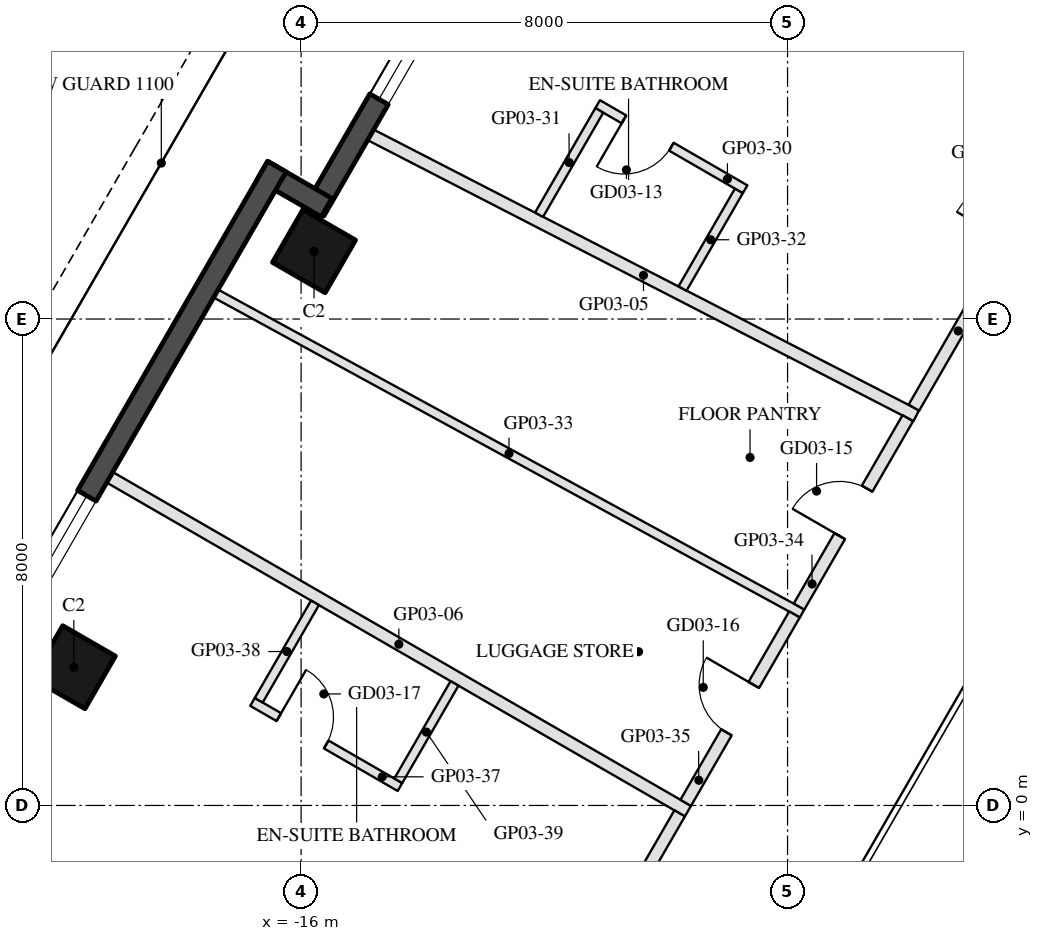
"""IFC4 building model, lengths in metres.
Left out: names, types, materials, properties, quantities, classifications, styles, units other than length and angle.
Written with IfcOpenShell. Run it as: python <this file> out.ifc"""

import sys

from ifc_helpers import new_model, si_unit, direction, frame, frame_2d, origin, origin_2d, place, context, subcontext, project, spatial, rectangle, hollow_rectangle, extrude, element, fill, save


model = new_model("IFC4")
c1 = context("Model", 3, precision=1e-05, world=origin(), true_north=direction((0.0, 1.0)))
c2 = subcontext(c1, "Body", "Model", "MODEL_VIEW")
j1 = project(units=[si_unit("LENGTHUNIT", "METRE"), si_unit("PLANEANGLEUNIT", "RADIAN")], contexts=[c1])
p1 = place(None, origin())
s1 = spatial("IfcSite", under=j1, at=p1, CompositionType="ELEMENT")
p2 = place(p1, origin())
s2 = spatial("IfcBuilding", under=s1, at=p2, CompositionType="ELEMENT")
p3 = place(p2, frame((0.0, 0.0, 61.3)))
s3 = spatial("IfcBuildingStorey", under=s2, at=p3, CompositionType="ELEMENT", Elevation=61.3)
for number, where, z_axis, x_axis in (
    (1, (-15.788, 9.115, 0.0), (0.0, 0.0, 1.0), (0.5, 0.866, 0.0)),
    (2, (-19.738, 2.273, 0.0), (0.0, 0.0, 1.0), (0.5, 0.866, 0.0)),
):
    element("IfcColumn", number, at=place(p3, frame(where, z_axis=z_axis, x_axis=x_axis)), inside=s3, PredefinedType="COLUMN", context=c2, shape_type="SweptSolid", body=[
        extrude(hollow_rectangle(XDim=1.0, YDim=1.0, WallThickness=0.045, at=origin_2d()), origin(), (0.0, 0.0, 1.0), 3.7),
    ])
p4 = place(p3, frame((-12.409, 15.617, 0.0), z_axis=(0.0, 0.0, 1.0), x_axis=(-0.500003597184, -0.866023326939, 0.0)))
e3 = element("IfcWall", 3, at=p4, inside=s3, PredefinedType="SOLIDWALL", context=c2, shape_type="SweptSolid", body=[
    extrude(rectangle(XDim=6.74, YDim=0.35, at=frame_2d((3.37, 0.0))), origin(), (0.0, 0.0, 1.0), 3.55),
])
p5 = place(p4, frame((0.32, 0.0, 0.3)))
e4 = element("IfcOpeningElement", 4, at=p5, cuts=e3, PredefinedType="OPENING", context=c2, shape_type="SweptSolid", body=[
    extrude(rectangle(XDim=2.0, YDim=2.65, at=frame_2d((1.0, 1.325))), frame((0.0, 0.185, 0.0), z_axis=(0.0, -1.0, 0.0), x_axis=(1.0, 0.0, 0.0)), (0.0, 0.0, 1.0), 0.37),
])
p6 = place(p4, frame((2.62, 0.0, 0.3)))
e5 = element("IfcOpeningElement", 5, at=p6, cuts=e3, PredefinedType="OPENING", context=c2, shape_type="SweptSolid", body=[
    extrude(rectangle(XDim=2.0, YDim=2.65, at=frame_2d((1.0, 1.325))), frame((0.0, 0.185, 0.0), z_axis=(0.0, -1.0, 0.0), x_axis=(1.0, 0.0, 0.0)), (0.0, 0.0, 1.0), 0.37),
])
p7 = place(p3, frame((-15.581, 9.833, 0.0), z_axis=(0.0, 0.0, 1.0), x_axis=(-0.866055662726, 0.499947586314, 0.0)))
e6 = element("IfcWall", 6, at=p7, inside=s3, PredefinedType="SOLIDWALL", context=c2, shape_type="SweptSolid", body=[
    extrude(rectangle(XDim=1.22, YDim=0.35, at=frame_2d((0.61, 0.0))), origin(), (0.0, 0.0, 1.0), 3.55),
])
p8 = place(p3, frame((-16.398, 10.507, 0.0), z_axis=(0.0, 0.0, 1.0), x_axis=(-0.499999142773, -0.866025898704, 0.0)))
e7 = element("IfcWall", 7, at=p8, inside=s3, PredefinedType="SOLIDWALL", context=c2, shape_type="SweptSolid", body=[
    extrude(rectangle(XDim=9.7, YDim=0.35, at=frame_2d((4.85, 0.0))), origin(), (0.0, 0.0, 1.0), 3.55),
])
p9 = place(p8, frame((6.25, 0.0, 0.3)))
e8 = element("IfcOpeningElement", 8, at=p9, cuts=e7, PredefinedType="OPENING", context=c2, shape_type="SweptSolid", body=[
    extrude(rectangle(XDim=1.6, YDim=2.65, at=frame_2d((0.8, 1.325))), frame((0.0, 0.185, 0.0), z_axis=(0.0, -1.0, 0.0), x_axis=(1.0, 0.0, 0.0)), (0.0, 0.0, 1.0), 0.37),
])
p10 = place(p3, frame((-14.856, 11.029, 0.0), z_axis=(0.0, 0.0, 1.0), x_axis=(0.889105841633, -0.457701652142, 0.0)))
e9 = element("IfcWall", 9, at=p10, inside=s3, PredefinedType="PARTITIONING", context=c2, shape_type="SweptSolid", body=[
    extrude(rectangle(XDim=10.092, YDim=0.2, at=frame_2d((5.046, 0.0))), origin(), (0.0, 0.0, 1.0), 2.96),
])
p11 = place(p3, frame((-19.147, 5.396, 0.0), z_axis=(0.0, 0.0, 1.0), x_axis=(0.866027479907, -0.499996404033, 0.0)))
e10 = element("IfcWall", 10, at=p11, inside=s3, PredefinedType="PARTITIONING", context=c2, shape_type="SweptSolid", body=[
    extrude(rectangle(XDim=10.98, YDim=0.2, at=frame_2d((5.49, 0.0))), origin(), (0.0, 0.0, 1.0), 2.96),
])
p12 = place(p3, frame((-5.922, 6.542, 0.0), z_axis=(0.0, 0.0, 1.0), x_axis=(0.499989401968, 0.866031522475, 0.0)))
e11 = element("IfcWall", 11, at=p12, inside=s3, PredefinedType="PARTITIONING", context=c2, shape_type="SweptSolid", body=[
    extrude(rectangle(XDim=7.283, YDim=0.2, at=frame_2d((3.642, 0.0))), origin(), (0.0, 0.0, 1.0), 2.95),
])
p13 = place(p12, frame((3.142, 0.0, 0.0)))
e12 = element("IfcOpeningElement", 12, at=p13, cuts=e11, PredefinedType="OPENING", context=c2, shape_type="SweptSolid", body=[
    extrude(rectangle(XDim=1.0, YDim=2.1, at=frame_2d((0.5, 1.05))), frame((0.0, 0.11, 0.0), z_axis=(0.0, -1.0, 0.0), x_axis=(1.0, 0.0, 0.0)), (0.0, 0.0, 1.0), 0.22),
])
p14 = place(p3, frame((-8.698, 10.134, 0.0), z_axis=(0.0, 0.0, 1.0), x_axis=(-0.866034573852, 0.49998411664, 0.0)))
e13 = element("IfcWall", 13, at=p14, inside=s3, PredefinedType="PARTITIONING", context=c2, shape_type="SweptSolid", body=[
    extrude(rectangle(XDim=2.8, YDim=0.15, at=frame_2d((1.4, 0.0))), origin(), (0.0, 0.0, 1.0), 3.55),
])
p15 = place(p14, frame((1.4, 0.0, 0.0)))
e14 = element("IfcOpeningElement", 14, at=p15, cuts=e13, PredefinedType="OPENING", context=c2, shape_type="SweptSolid", body=[
    extrude(rectangle(XDim=0.9, YDim=2.1, at=frame_2d((0.45, 1.05))), frame((0.0, 0.085, 0.0), z_axis=(0.0, -1.0, 0.0), x_axis=(1.0, 0.0, 0.0)), (0.0, 0.0, 1.0), 0.17),
])
p16 = place(p3, frame((-11.096, 11.432, 0.0), z_axis=(0.0, 0.0, 1.0), x_axis=(-0.500035331196, -0.866005004348, 0.0)))
e15 = element("IfcWall", 15, at=p16, inside=s3, PredefinedType="PARTITIONING", context=c2, shape_type="SweptSolid", body=[
    extrude(rectangle(XDim=1.981, YDim=0.15, at=frame_2d((0.991, 0.0))), origin(), (0.0, 0.0, 1.0), 2.95),
])
p17 = place(p3, frame((-8.801, 10.107, 0.0), z_axis=(0.0, 0.0, 1.0), x_axis=(-0.499992292652, -0.866029853578, 0.0)))
e16 = element("IfcWall", 16, at=p17, inside=s3, PredefinedType="PARTITIONING", context=c2, shape_type="SweptSolid", body=[
    extrude(rectangle(XDim=1.854, YDim=0.15, at=frame_2d((0.927, 0.0))), origin(), (0.0, 0.0, 1.0), 2.95),
])
p18 = place(p3, frame((-17.402, 8.419, 0.0), z_axis=(0.0, 0.0, 1.0), x_axis=(0.877831004422, -0.47897048727, 0.0)))
e17 = element("IfcWall", 17, at=p18, inside=s3, PredefinedType="PARTITIONING", context=c2, shape_type="SweptSolid", body=[
    extrude(rectangle(XDim=10.983, YDim=0.15, at=frame_2d((5.492, 0.0))), origin(), (0.0, 0.0, 1.0), 2.96),
])
p19 = place(p3, frame((-7.811, 3.271, 0.0), z_axis=(0.0, 0.0, 1.0), x_axis=(0.4999705729, 0.866042392862, 0.0)))
e18 = element("IfcWall", 18, at=p19, inside=s3, PredefinedType="PARTITIONING", context=c2, shape_type="SweptSolid", body=[
    extrude(rectangle(XDim=3.577, YDim=0.2, at=frame_2d((1.789, 0.0))), origin(), (0.0, 0.0, 1.0), 2.95),
])
p20 = place(p19, frame((1.339, 0.0, 0.0)))
e19 = element("IfcOpeningElement", 19, at=p20, cuts=e18, PredefinedType="OPENING", context=c2, shape_type="SweptSolid", body=[
    extrude(rectangle(XDim=0.9, YDim=2.1, at=frame_2d((0.45, 1.05))), frame((0.0, 0.11, 0.0), z_axis=(0.0, -1.0, 0.0), x_axis=(1.0, 0.0, 0.0)), (0.0, 0.0, 1.0), 0.22),
])
p21 = place(p3, frame((-9.675, 0.043, 0.0), z_axis=(0.0, 0.0, 1.0), x_axis=(0.500000124603, 0.866025331845, 0.0)))
e20 = element("IfcWall", 20, at=p21, inside=s3, PredefinedType="PARTITIONING", context=c2, shape_type="SweptSolid", body=[
    extrude(rectangle(XDim=3.577, YDim=0.2, at=frame_2d((1.789, 0.0))), origin(), (0.0, 0.0, 1.0), 2.95),
])
p22 = place(p21, frame((1.339, 0.0, 0.0)))
e21 = element("IfcOpeningElement", 21, at=p22, cuts=e20, PredefinedType="OPENING", context=c2, shape_type="SweptSolid", body=[
    extrude(rectangle(XDim=0.9, YDim=2.1, at=frame_2d((0.45, 1.05))), frame((0.0, 0.11, 0.0), z_axis=(0.0, -1.0, 0.0), x_axis=(1.0, 0.0, 0.0)), (0.0, 0.0, 1.0), 0.22),
])
p23 = place(p3, frame((-12.269, -4.45, 0.0), z_axis=(0.0, 0.0, 1.0), x_axis=(0.500013374061, 0.866017682129, 0.0)))
e22 = element("IfcWall", 22, at=p23, inside=s3, PredefinedType="PARTITIONING", context=c2, shape_type="SweptSolid", body=[
    extrude(rectangle(XDim=4.988, YDim=0.2, at=frame_2d((2.494, 0.0))), origin(), (0.0, 0.0, 1.0), 2.95),
])
p24 = place(p23, frame((1.994, 0.0, 0.0)))
e23 = element("IfcOpeningElement", 23, at=p24, cuts=e22, PredefinedType="OPENING", context=c2, shape_type="SweptSolid", body=[
    extrude(rectangle(XDim=1.0, YDim=2.1, at=frame_2d((0.5, 1.05))), frame((0.0, 0.11, 0.0), z_axis=(0.0, -1.0, 0.0), x_axis=(1.0, 0.0, 0.0)), (0.0, 0.0, 1.0), 0.22),
])
p25 = place(p3, frame((-16.799, 1.703, 0.0), z_axis=(0.0, 0.0, 1.0), x_axis=(0.865996816683, -0.500049511043, 0.0)))
e24 = element("IfcWall", 24, at=p25, inside=s3, PredefinedType="PARTITIONING", context=c2, shape_type="SweptSolid", body=[
    extrude(rectangle(XDim=2.8, YDim=0.15, at=frame_2d((1.4, 0.0))), origin(), (0.0, 0.0, 1.0), 3.55),
])
p26 = place(p25, frame((0.5, 0.0, 0.0)))
e25 = element("IfcOpeningElement", 25, at=p26, cuts=e24, PredefinedType="OPENING", context=c2, shape_type="SweptSolid", body=[
    extrude(rectangle(XDim=0.9, YDim=2.1, at=frame_2d((0.45, 1.05))), frame((0.0, 0.085, 0.0), z_axis=(0.0, -1.0, 0.0), x_axis=(1.0, 0.0, 0.0)), (0.0, 0.0, 1.0), 0.17),
])
p27 = place(p3, frame((-15.772, 3.333, 0.0), z_axis=(0.0, 0.0, 1.0), x_axis=(-0.499985172903, -0.866033964044, 0.0)))
e26 = element("IfcWall", 26, at=p27, inside=s3, PredefinedType="PARTITIONING", context=c2, shape_type="SweptSolid", body=[
    extrude(rectangle(XDim=1.85, YDim=0.15, at=frame_2d((0.925, 0.0))), origin(), (0.0, 0.0, 1.0), 3.55),
])
p28 = place(p3, frame((-13.477, 2.007, 0.0), z_axis=(0.0, 0.0, 1.0), x_axis=(-0.500042316284, -0.866000971088, 0.0)))
e27 = element("IfcWall", 27, at=p28, inside=s3, PredefinedType="PARTITIONING", context=c2, shape_type="SweptSolid", body=[
    extrude(rectangle(XDim=1.85, YDim=0.15, at=frame_2d((0.925, 0.0))), origin(), (0.0, 0.0, 1.0), 3.55),
])
p29 = place(p6, origin())
e28 = element("IfcWindow", 28, at=p29, inside=s3, PartitioningType="SINGLE_PANEL", PredefinedType="WINDOW", context=c2, shape_type="SweptSolid", body=[
    extrude(rectangle(XDim=2.0, YDim=2.65, at=frame_2d((1.0, 1.325))), frame((0.0, 0.03, 0.0), z_axis=(0.0, -1.0, 0.0), x_axis=(1.0, 0.0, 0.0)), (0.0, 0.0, 1.0), 0.06),
])
fill(e5, e28)
p30 = place(p9, origin())
e29 = element("IfcWindow", 29, at=p30, inside=s3, PartitioningType="SINGLE_PANEL", PredefinedType="WINDOW", context=c2, shape_type="SweptSolid", body=[
    extrude(rectangle(XDim=1.6, YDim=2.65, at=frame_2d((0.8, 1.325))), frame((0.0, 0.03, 0.0), z_axis=(0.0, -1.0, 0.0), x_axis=(1.0, 0.0, 0.0)), (0.0, 0.0, 1.0), 0.06),
])
fill(e8, e29)
p31 = place(p15, origin())
e30 = element("IfcDoor", 30, at=p31, inside=s3, OperationType="SINGLE_SWING_RIGHT", PredefinedType="DOOR", context=c2, shape_type="SweptSolid", body=[
    extrude(rectangle(XDim=0.9, YDim=2.1, at=frame_2d((0.45, 1.05))), frame((0.0, 0.025, 0.0), z_axis=(0.0, -1.0, 0.0), x_axis=(1.0, 0.0, 0.0)), (0.0, 0.0, 1.0), 0.05),
])
fill(e14, e30)
p32 = place(p20, origin())
e31 = element("IfcDoor", 31, at=p32, inside=s3, OperationType="SINGLE_SWING_LEFT", PredefinedType="DOOR", context=c2, shape_type="SweptSolid", body=[
    extrude(rectangle(XDim=0.9, YDim=2.1, at=frame_2d((0.45, 1.05))), frame((0.0, 0.025, 0.0), z_axis=(0.0, -1.0, 0.0), x_axis=(1.0, 0.0, 0.0)), (0.0, 0.0, 1.0), 0.05),
])
fill(e19, e31)
p33 = place(p22, origin())
e32 = element("IfcDoor", 32, at=p33, inside=s3, OperationType="SINGLE_SWING_RIGHT", PredefinedType="DOOR", context=c2, shape_type="SweptSolid", body=[
    extrude(rectangle(XDim=0.9, YDim=2.1, at=frame_2d((0.45, 1.05))), frame((0.0, 0.025, 0.0), z_axis=(0.0, -1.0, 0.0), x_axis=(1.0, 0.0, 0.0)), (0.0, 0.0, 1.0), 0.05),
])
fill(e21, e32)
p34 = place(p26, origin())
e33 = element("IfcDoor", 33, at=p34, inside=s3, OperationType="SINGLE_SWING_LEFT", PredefinedType="DOOR", context=c2, shape_type="SweptSolid", body=[
    extrude(rectangle(XDim=0.9, YDim=2.1, at=frame_2d((0.45, 1.05))), frame((0.0, 0.025, 0.0), z_axis=(0.0, -1.0, 0.0), x_axis=(1.0, 0.0, 0.0)), (0.0, 0.0, 1.0), 0.05),
])
fill(e25, e33)
save(model, sys.argv[1])
